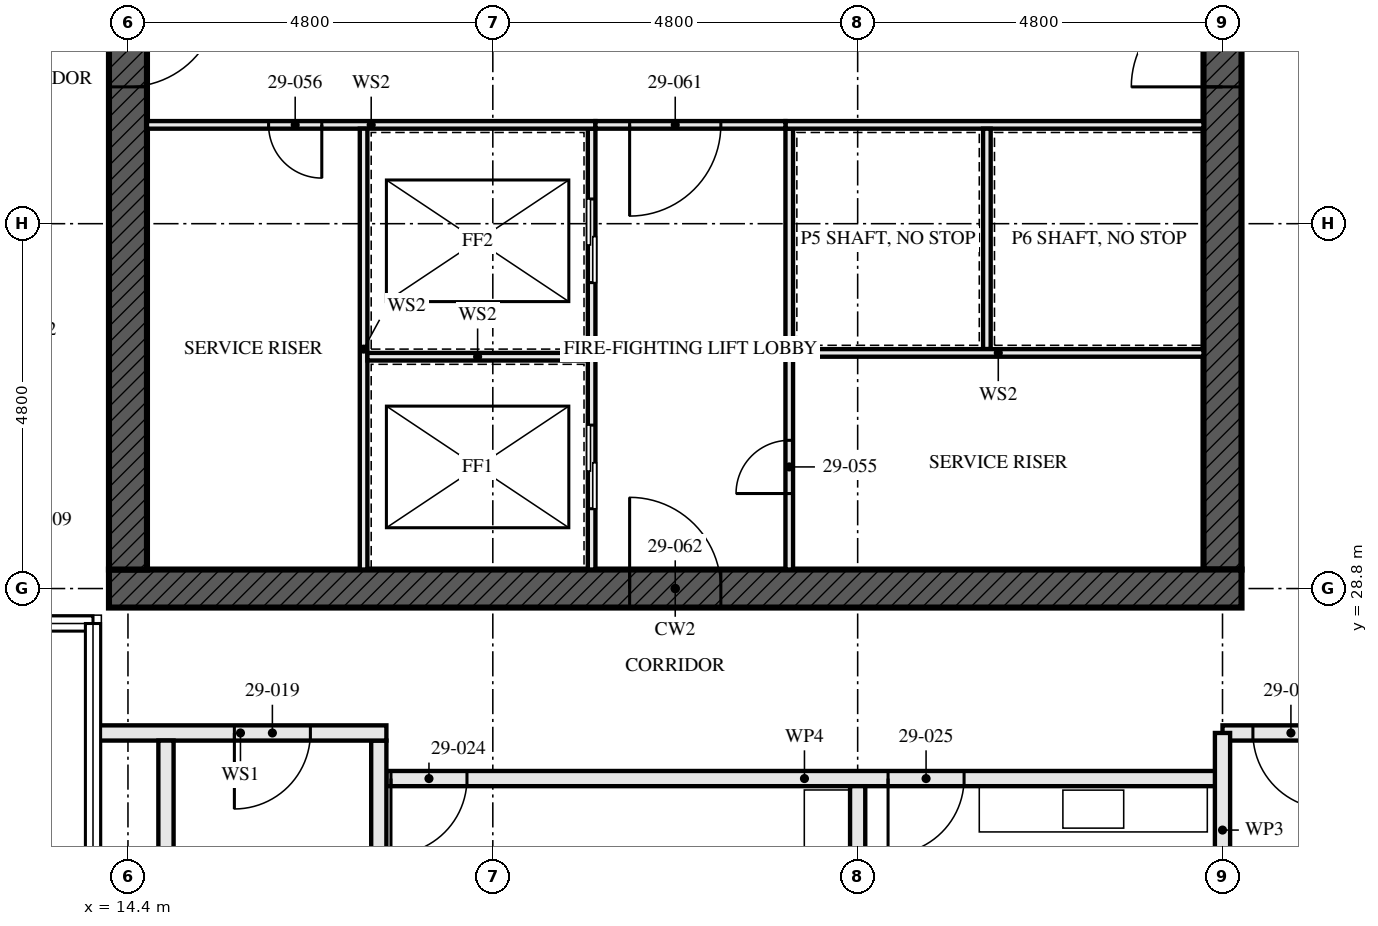
"""IFC4 building model, lengths in metres.
Left out: names, types, materials, properties, quantities, classifications, styles, units other than length and angle.
Written with IfcOpenShell. Run it as: python <this file> out.ifc"""

import sys

from ifc_helpers import new_model, si_unit, direction, frame, frame_2d, origin, place, context, subcontext, project, spatial, rectangle, extrude, element, fill, save


model = new_model("IFC4")
c1 = context("Model", 3, precision=1e-05, world=origin(), true_north=direction((0.0, 1.0)))
c2 = subcontext(c1, "Body", "Model", "MODEL_VIEW")
j1 = project(units=[si_unit("LENGTHUNIT", "METRE"), si_unit("PLANEANGLEUNIT", "RADIAN")], contexts=[c1])
p1 = place(None, origin())
s1 = spatial("IfcSite", under=j1, at=p1, CompositionType="ELEMENT")
p2 = place(p1, origin())
s2 = spatial("IfcBuilding", under=s1, at=p2, CompositionType="ELEMENT")
p3 = place(p2, frame((0.0, 0.0, 108.5)))
s3 = spatial("IfcBuildingStorey", under=s2, at=p3, CompositionType="ELEMENT", Elevation=108.5)
p4 = place(p3, frame((14.15, 28.8, -0.17), z_axis=(0.0, 0.0, 1.0), x_axis=(1.0, 0.0, 0.0)))
e1 = element("IfcWall", 1, at=p4, inside=s3, PredefinedType="SHEAR", context=c2, shape_type="SweptSolid", body=[
    extrude(rectangle(XDim=14.9, YDim=0.5, at=frame_2d((7.45, 0.0))), origin(), (0.0, 0.0, 1.0), 3.5),
])
p5 = place(p4, frame((6.85, 0.0, 0.17)))
e2 = element("IfcOpeningElement", 2, at=p5, cuts=e1, PredefinedType="OPENING", context=c2, shape_type="SweptSolid", body=[
    extrude(rectangle(XDim=1.2, YDim=2.1, at=frame_2d((0.6, 1.05))), frame((0.0, 0.26, 0.0), z_axis=(0.0, -1.0, 0.0), x_axis=(1.0, 0.0, 0.0)), (0.0, 0.0, 1.0), 0.521),
])
p6 = place(p3, frame((14.4, 42.95, -0.17), z_axis=(0.0, 0.0, 1.0), x_axis=(0.0, -1.0, 0.0)))
e3 = element("IfcWall", 3, at=p6, inside=s3, PredefinedType="SHEAR", context=c2, shape_type="SweptSolid", body=[
    extrude(rectangle(XDim=13.9, YDim=0.5, at=frame_2d((6.95, 0.0))), origin(), (0.0, 0.0, 1.0), 3.5),
])
p7 = place(p6, frame((6.35, 0.0, 0.17)))
e4 = element("IfcOpeningElement", 4, at=p7, cuts=e3, PredefinedType="OPENING", context=c2, shape_type="SweptSolid", body=[
    extrude(rectangle(XDim=1.2, YDim=2.1, at=frame_2d((0.6, 1.05))), frame((0.0, 0.26, 0.0), z_axis=(0.0, -1.0, 0.0), x_axis=(1.0, 0.0, 0.0)), (0.0, 0.0, 1.0), 0.521),
])
p8 = place(p3, frame((28.8, 29.05, -0.17), z_axis=(0.0, 0.0, 1.0), x_axis=(0.0, 1.0, 0.0)))
e5 = element("IfcWall", 5, at=p8, inside=s3, PredefinedType="SHEAR", context=c2, shape_type="SweptSolid", body=[
    extrude(rectangle(XDim=13.9, YDim=0.5, at=frame_2d((6.95, 0.0))), origin(), (0.0, 0.0, 1.0), 3.5),
])
p9 = place(p8, frame((6.35, 0.0, 0.17)))
e6 = element("IfcOpeningElement", 6, at=p9, cuts=e5, PredefinedType="OPENING", context=c2, shape_type="SweptSolid", body=[
    extrude(rectangle(XDim=1.2, YDim=2.1, at=frame_2d((0.6, 1.05))), frame((0.0, 0.26, 0.0), z_axis=(0.0, -1.0, 0.0), x_axis=(1.0, 0.0, 0.0)), (0.0, 0.0, 1.0), 0.521),
])
for number, where, z_axis, x_axis in (
    (7, (14.9, 22.1, 0.0), (0.0, 0.0, 1.0), (0.0, 1.0, 0.0)),
    (8, (17.7, 22.1, 0.0), (0.0, 0.0, 1.0), (0.0, 1.0, 0.0)),
):
    element("IfcWall", number, at=place(p3, frame(where, z_axis=z_axis, x_axis=x_axis)), inside=s3, PredefinedType="SOLIDWALL", context=c2, shape_type="SweptSolid", body=[
        extrude(rectangle(XDim=4.7, YDim=0.2, at=frame_2d((2.35, 0.0))), origin(), (0.0, 0.0, 1.0), 2.99),
    ])
p10 = place(p3, frame((13.96, 26.9, 0.0), z_axis=(0.0, 0.0, 1.0), x_axis=(1.0, 0.0, 0.0)))
e9 = element("IfcWall", 9, at=p10, inside=s3, PredefinedType="SOLIDWALL", context=c2, shape_type="SweptSolid", body=[
    extrude(rectangle(XDim=3.84, YDim=0.2, at=frame_2d((1.92, 0.0))), origin(), (0.0, 0.0, 1.0), 2.32),
])
p11 = place(p10, frame((1.84, 0.0, 0.0)))
e10 = element("IfcOpeningElement", 10, at=p11, cuts=e9, PredefinedType="OPENING", context=c2, shape_type="SweptSolid", body=[
    extrude(rectangle(XDim=1.0, YDim=2.1, at=frame_2d((0.5, 1.05))), frame((0.0, 0.111, 0.0), z_axis=(0.0, -1.0, 0.0), x_axis=(1.0, 0.0, 0.0)), (0.0, 0.0, 1.0), 0.221),
])
p12 = place(p3, frame((24.0, 14.72, 0.0), z_axis=(0.0, 0.0, 1.0), x_axis=(0.0, 1.0, 0.0)))
e11 = element("IfcWall", 11, at=p12, inside=s3, PredefinedType="PARTITIONING", context=c2, shape_type="SweptSolid", body=[
    extrude(rectangle(XDim=11.48, YDim=0.2, at=frame_2d((5.74, 0.0))), origin(), (0.0, 0.0, 1.0), 2.55),
])
p13 = place(p3, frame((17.8, 26.3, 0.0), z_axis=(0.0, 0.0, 1.0), x_axis=(1.0, 0.0, 0.0)))
e12 = element("IfcWall", 12, at=p13, inside=s3, PredefinedType="PARTITIONING", context=c2, shape_type="SweptSolid", body=[
    extrude(rectangle(XDim=11.0, YDim=0.2, at=frame_2d((5.5, 0.0))), origin(), (0.0, 0.0, 1.0), 2.55),
])
p14 = place(p13, frame((0.06, 0.0, 0.0)))
e13 = element("IfcOpeningElement", 13, at=p14, cuts=e12, PredefinedType="OPENING", context=c2, shape_type="SweptSolid", body=[
    extrude(rectangle(XDim=1.0, YDim=2.1, at=frame_2d((0.5, 1.05))), frame((0.0, 0.111, 0.0), z_axis=(0.0, -1.0, 0.0), x_axis=(1.0, 0.0, 0.0)), (0.0, 0.0, 1.0), 0.221),
])
p15 = place(p13, frame((6.6, 0.0, 0.0)))
e14 = element("IfcOpeningElement", 14, at=p15, cuts=e12, PredefinedType="OPENING", context=c2, shape_type="SweptSolid", body=[
    extrude(rectangle(XDim=1.0, YDim=2.1, at=frame_2d((0.5, 1.05))), frame((0.0, 0.111, 0.0), z_axis=(0.0, -1.0, 0.0), x_axis=(1.0, 0.0, 0.0)), (0.0, 0.0, 1.0), 0.221),
])
p16 = place(p3, frame((28.8, 26.9, 0.0), z_axis=(0.0, 0.0, 1.0), x_axis=(1.0, 0.0, 0.0)))
e15 = element("IfcWall", 15, at=p16, inside=s3, PredefinedType="PARTITIONING", context=c2, shape_type="SweptSolid", body=[
    extrude(rectangle(XDim=9.6, YDim=0.2, at=frame_2d((4.8, 0.0))), origin(), (0.0, 0.0, 1.0), 3.33),
])
p17 = place(p16, frame((0.4, 0.0, 0.0)))
e16 = element("IfcOpeningElement", 16, at=p17, cuts=e15, PredefinedType="OPENING", context=c2, shape_type="SweptSolid", body=[
    extrude(rectangle(XDim=1.0, YDim=2.1, at=frame_2d((0.5, 1.05))), frame((0.0, 0.111, 0.0), z_axis=(0.0, -1.0, 0.0), x_axis=(1.0, 0.0, 0.0)), (0.0, 0.0, 1.0), 0.221),
])
p18 = place(p16, frame((5.2, 0.0, 0.0)))
e17 = element("IfcOpeningElement", 17, at=p18, cuts=e15, PredefinedType="OPENING", context=c2, shape_type="SweptSolid", body=[
    extrude(rectangle(XDim=1.0, YDim=2.1, at=frame_2d((0.5, 1.05))), frame((0.0, 0.111, 0.0), z_axis=(0.0, -1.0, 0.0), x_axis=(1.0, 0.0, 0.0)), (0.0, 0.0, 1.0), 0.221),
])
p19 = place(p3, frame((20.5, 29.05, 0.0), z_axis=(0.0, 0.0, 1.0), x_axis=(0.0, 1.0, 0.0)))
e18 = element("IfcWall", 18, at=p19, inside=s3, PredefinedType="SOLIDWALL", context=c2, shape_type="SweptSolid", body=[
    extrude(rectangle(XDim=5.8, YDim=0.1, at=frame_2d((2.9, 0.0))), origin(), (0.0, 0.0, 1.0), 3.33),
])
p20 = place(p19, frame((0.8, 0.0, 0.0)))
e19 = element("IfcOpeningElement", 19, at=p20, cuts=e18, PredefinedType="OPENING", context=c2, shape_type="SweptSolid", body=[
    extrude(rectangle(XDim=1.1, YDim=2.3, at=frame_2d((0.55, 1.15))), frame((0.0, 0.061, 0.0), z_axis=(0.0, -1.0, 0.0), x_axis=(1.0, 0.0, 0.0)), (0.0, 0.0, 1.0), 0.121),
])
p21 = place(p19, frame((3.775, 0.0, 0.0)))
e20 = element("IfcOpeningElement", 20, at=p21, cuts=e18, PredefinedType="OPENING", context=c2, shape_type="SweptSolid", body=[
    extrude(rectangle(XDim=1.1, YDim=2.3, at=frame_2d((0.55, 1.15))), frame((0.0, 0.061, 0.0), z_axis=(0.0, -1.0, 0.0), x_axis=(1.0, 0.0, 0.0)), (0.0, 0.0, 1.0), 0.121),
])
p22 = place(p3, frame((23.1, 29.05, 0.0), z_axis=(0.0, 0.0, 1.0), x_axis=(0.0, 1.0, 0.0)))
e21 = element("IfcWall", 21, at=p22, inside=s3, PredefinedType="SOLIDWALL", context=c2, shape_type="SweptSolid", body=[
    extrude(rectangle(XDim=5.8, YDim=0.1, at=frame_2d((2.9, 0.0))), origin(), (0.0, 0.0, 1.0), 3.33),
])
p23 = place(p22, frame((1.0, 0.0, 0.0)))
e22 = element("IfcOpeningElement", 22, at=p23, cuts=e21, PredefinedType="OPENING", context=c2, shape_type="SweptSolid", body=[
    extrude(rectangle(XDim=0.7, YDim=2.1, at=frame_2d((0.35, 1.05))), frame((0.0, 0.061, 0.0), z_axis=(0.0, -1.0, 0.0), x_axis=(1.0, 0.0, 0.0)), (0.0, 0.0, 1.0), 0.121),
])
p24 = place(p3, frame((14.65, 34.9, 0.0), z_axis=(0.0, 0.0, 1.0), x_axis=(1.0, 0.0, 0.0)))
e23 = element("IfcWall", 23, at=p24, inside=s3, PredefinedType="SOLIDWALL", context=c2, shape_type="SweptSolid", body=[
    extrude(rectangle(XDim=5.9, YDim=0.1, at=frame_2d((2.95, 0.0))), origin(), (0.0, 0.0, 1.0), 3.33),
])
p25 = place(p24, frame((1.6, 0.0, 0.0)))
e24 = element("IfcOpeningElement", 24, at=p25, cuts=e23, PredefinedType="OPENING", context=c2, shape_type="SweptSolid", body=[
    extrude(rectangle(XDim=0.7, YDim=2.1, at=frame_2d((0.35, 1.05))), frame((0.0, 0.061, 0.0), z_axis=(0.0, -1.0, 0.0), x_axis=(1.0, 0.0, 0.0)), (0.0, 0.0, 1.0), 0.121),
])
p26 = place(p3, frame((23.05, 34.9, 0.0), z_axis=(0.0, 0.0, 1.0), x_axis=(1.0, 0.0, 0.0)))
e25 = element("IfcWall", 25, at=p26, inside=s3, PredefinedType="SOLIDWALL", context=c2, shape_type="SweptSolid", body=[
    extrude(rectangle(XDim=5.5, YDim=0.1, at=frame_2d((2.75, 0.0))), origin(), (0.0, 0.0, 1.0), 3.33),
])
p27 = place(p3, frame((20.55, 34.9, 0.0), z_axis=(0.0, 0.0, 1.0), x_axis=(1.0, 0.0, 0.0)))
e26 = element("IfcWall", 26, at=p27, inside=s3, PredefinedType="SOLIDWALL", context=c2, shape_type="SweptSolid", body=[
    extrude(rectangle(XDim=2.5, YDim=0.1, at=frame_2d((1.25, 0.0))), origin(), (0.0, 0.0, 1.0), 3.33),
])
p28 = place(p27, frame((0.45, 0.0, 0.0)))
e27 = element("IfcOpeningElement", 27, at=p28, cuts=e26, PredefinedType="OPENING", context=c2, shape_type="SweptSolid", body=[
    extrude(rectangle(XDim=1.2, YDim=2.1, at=frame_2d((0.6, 1.05))), frame((0.0, 0.061, 0.0), z_axis=(0.0, -1.0, 0.0), x_axis=(1.0, 0.0, 0.0)), (0.0, 0.0, 1.0), 0.121),
])
p29 = place(p3, frame((17.5, 29.05, 0.0), z_axis=(0.0, 0.0, 1.0), x_axis=(0.0, 1.0, 0.0)))
e28 = element("IfcWall", 28, at=p29, inside=s3, PredefinedType="SOLIDWALL", context=c2, shape_type="SweptSolid", body=[
    extrude(rectangle(XDim=5.8, YDim=0.1, at=frame_2d((2.9, 0.0))), origin(), (0.0, 0.0, 1.0), 3.33),
])
p30 = place(p3, frame((17.55, 31.85, 0.0), z_axis=(0.0, 0.0, 1.0), x_axis=(1.0, 0.0, 0.0)))
e29 = element("IfcWall", 29, at=p30, inside=s3, PredefinedType="SOLIDWALL", context=c2, shape_type="SweptSolid", body=[
    extrude(rectangle(XDim=2.9, YDim=0.1, at=frame_2d((1.45, 0.0))), origin(), (0.0, 0.0, 1.0), 3.33),
])
p31 = place(p3, frame((25.7, 31.95, 0.0), z_axis=(0.0, 0.0, 1.0), x_axis=(0.0, 1.0, 0.0)))
e30 = element("IfcWall", 30, at=p31, inside=s3, PredefinedType="SOLIDWALL", context=c2, shape_type="SweptSolid", body=[
    extrude(rectangle(XDim=2.9, YDim=0.1, at=frame_2d((1.45, 0.0))), origin(), (0.0, 0.0, 1.0), 3.33),
])
p32 = place(p3, frame((23.15, 31.9, 0.0), z_axis=(0.0, 0.0, 1.0), x_axis=(1.0, 0.0, 0.0)))
e31 = element("IfcWall", 31, at=p32, inside=s3, PredefinedType="SOLIDWALL", context=c2, shape_type="SweptSolid", body=[
    extrude(rectangle(XDim=5.4, YDim=0.1, at=frame_2d((2.7, 0.0))), origin(), (0.0, 0.0, 1.0), 3.33),
])
p33 = place(p3, frame((28.8, 24.345, 0.0), z_axis=(0.0, 0.0, 1.0), x_axis=(0.0, 1.0, 0.0)))
e32 = element("IfcWall", 32, at=p33, inside=s3, PredefinedType="PARTITIONING", context=c2, shape_type="SweptSolid", body=[
    extrude(rectangle(XDim=2.555, YDim=0.2, at=frame_2d((1.277, 0.0))), origin(), (0.0, 0.0, 1.0), 2.32),
])
p34 = place(p11, frame((1.0, 0.0, 0.0), z_axis=(0.0, 0.0, 1.0), x_axis=(-1.0, 0.0, 0.0)))
e33 = element("IfcDoor", 33, at=p34, inside=s3, OperationType="SINGLE_SWING_LEFT", PredefinedType="DOOR", context=c2, shape_type="SweptSolid", body=[
    extrude(rectangle(XDim=1.0, YDim=2.1, at=frame_2d((0.5, 1.05))), frame((0.0, 0.032, 0.0), z_axis=(0.0, -1.0, 0.0), x_axis=(1.0, 0.0, 0.0)), (0.0, 0.0, 1.0), 0.064),
])
fill(e10, e33)
p35 = place(p14, frame((1.0, 0.0, 0.0), z_axis=(0.0, 0.0, 1.0), x_axis=(-1.0, 0.0, 0.0)))
e34 = element("IfcDoor", 34, at=p35, inside=s3, OperationType="SINGLE_SWING_LEFT", PredefinedType="DOOR", context=c2, shape_type="SweptSolid", body=[
    extrude(rectangle(XDim=1.0, YDim=2.1, at=frame_2d((0.5, 1.05))), frame((0.0, 0.027, 0.0), z_axis=(0.0, -1.0, 0.0), x_axis=(1.0, 0.0, 0.0)), (0.0, 0.0, 1.0), 0.054),
])
fill(e13, e34)
p36 = place(p15, frame((1.0, 0.0, 0.0), z_axis=(0.0, 0.0, 1.0), x_axis=(-1.0, 0.0, 0.0)))
e35 = element("IfcDoor", 35, at=p36, inside=s3, OperationType="SINGLE_SWING_LEFT", PredefinedType="DOOR", context=c2, shape_type="SweptSolid", body=[
    extrude(rectangle(XDim=1.0, YDim=2.1, at=frame_2d((0.5, 1.05))), frame((0.0, 0.027, 0.0), z_axis=(0.0, -1.0, 0.0), x_axis=(1.0, 0.0, 0.0)), (0.0, 0.0, 1.0), 0.054),
])
fill(e14, e35)
p37 = place(p17, frame((1.0, 0.0, 0.0), z_axis=(0.0, 0.0, 1.0), x_axis=(-1.0, 0.0, 0.0)))
e36 = element("IfcDoor", 36, at=p37, inside=s3, OperationType="SINGLE_SWING_RIGHT", PredefinedType="DOOR", context=c2, shape_type="SweptSolid", body=[
    extrude(rectangle(XDim=1.0, YDim=2.1, at=frame_2d((0.5, 1.05))), frame((0.0, 0.027, 0.0), z_axis=(0.0, -1.0, 0.0), x_axis=(1.0, 0.0, 0.0)), (0.0, 0.0, 1.0), 0.054),
])
fill(e16, e36)
p38 = place(p20, origin())
e37 = element("IfcDoor", 37, at=p38, inside=s3, OperationType="SLIDING_TO_LEFT", PredefinedType="DOOR", context=c2, shape_type="SweptSolid", body=[
    extrude(rectangle(XDim=1.1, YDim=2.3, at=frame_2d((0.55, 1.15))), frame((0.0, 0.05, 0.0), z_axis=(0.0, -1.0, 0.0), x_axis=(1.0, 0.0, 0.0)), (0.0, 0.0, 1.0), 0.1),
])
fill(e19, e37)
p39 = place(p21, origin())
e38 = element("IfcDoor", 38, at=p39, inside=s3, OperationType="SLIDING_TO_LEFT", PredefinedType="DOOR", context=c2, shape_type="SweptSolid", body=[
    extrude(rectangle(XDim=1.1, YDim=2.3, at=frame_2d((0.55, 1.15))), frame((0.0, 0.05, 0.0), z_axis=(0.0, -1.0, 0.0), x_axis=(1.0, 0.0, 0.0)), (0.0, 0.0, 1.0), 0.1),
])
fill(e20, e38)
p40 = place(p23, origin())
e39 = element("IfcDoor", 39, at=p40, inside=s3, OperationType="SINGLE_SWING_RIGHT", PredefinedType="DOOR", context=c2, shape_type="SweptSolid", body=[
    extrude(rectangle(XDim=0.7, YDim=2.1, at=frame_2d((0.35, 1.05))), frame((0.0, 0.027, 0.0), z_axis=(0.0, -1.0, 0.0), x_axis=(1.0, 0.0, 0.0)), (0.0, 0.0, 1.0), 0.054),
])
fill(e22, e39)
p41 = place(p25, frame((0.7, 0.0, 0.0), z_axis=(0.0, 0.0, 1.0), x_axis=(-1.0, 0.0, 0.0)))
e40 = element("IfcDoor", 40, at=p41, inside=s3, OperationType="SINGLE_SWING_RIGHT", PredefinedType="DOOR", context=c2, shape_type="SweptSolid", body=[
    extrude(rectangle(XDim=0.7, YDim=2.1, at=frame_2d((0.35, 1.05))), frame((0.0, 0.027, 0.0), z_axis=(0.0, -1.0, 0.0), x_axis=(1.0, 0.0, 0.0)), (0.0, 0.0, 1.0), 0.054),
])
fill(e24, e40)
p42 = place(p28, frame((1.2, 0.0, 0.0), z_axis=(0.0, 0.0, 1.0), x_axis=(-1.0, 0.0, 0.0)))
e41 = element("IfcDoor", 41, at=p42, inside=s3, OperationType="SINGLE_SWING_LEFT", PredefinedType="DOOR", context=c2, shape_type="SweptSolid", body=[
    extrude(rectangle(XDim=1.2, YDim=2.1, at=frame_2d((0.6, 1.05))), frame((0.0, 0.027, 0.0), z_axis=(0.0, -1.0, 0.0), x_axis=(1.0, 0.0, 0.0)), (0.0, 0.0, 1.0), 0.054),
])
fill(e27, e41)
p43 = place(p5, origin())
e42 = element("IfcDoor", 42, at=p43, inside=s3, OperationType="SINGLE_SWING_LEFT", PredefinedType="DOOR", context=c2, shape_type="SweptSolid", body=[
    extrude(rectangle(XDim=1.2, YDim=2.1, at=frame_2d((0.6, 1.05))), frame((0.0, 0.027, 0.0), z_axis=(0.0, -1.0, 0.0), x_axis=(1.0, 0.0, 0.0)), (0.0, 0.0, 1.0), 0.054),
])
fill(e2, e42)
p44 = place(p7, origin())
e43 = element("IfcDoor", 43, at=p44, inside=s3, OperationType="SINGLE_SWING_LEFT", PredefinedType="DOOR", context=c2, shape_type="SweptSolid", body=[
    extrude(rectangle(XDim=1.2, YDim=2.1, at=frame_2d((0.6, 1.05))), frame((0.0, 0.027, 0.0), z_axis=(0.0, -1.0, 0.0), x_axis=(1.0, 0.0, 0.0)), (0.0, 0.0, 1.0), 0.054),
])
fill(e4, e43)
p45 = place(p9, origin())
e44 = element("IfcDoor", 44, at=p45, inside=s3, OperationType="SINGLE_SWING_LEFT", PredefinedType="DOOR", context=c2, shape_type="SweptSolid", body=[
    extrude(rectangle(XDim=1.2, YDim=2.1, at=frame_2d((0.6, 1.05))), frame((0.0, 0.027, 0.0), z_axis=(0.0, -1.0, 0.0), x_axis=(1.0, 0.0, 0.0)), (0.0, 0.0, 1.0), 0.054),
])
fill(e6, e44)
save(model, sys.argv[1])
